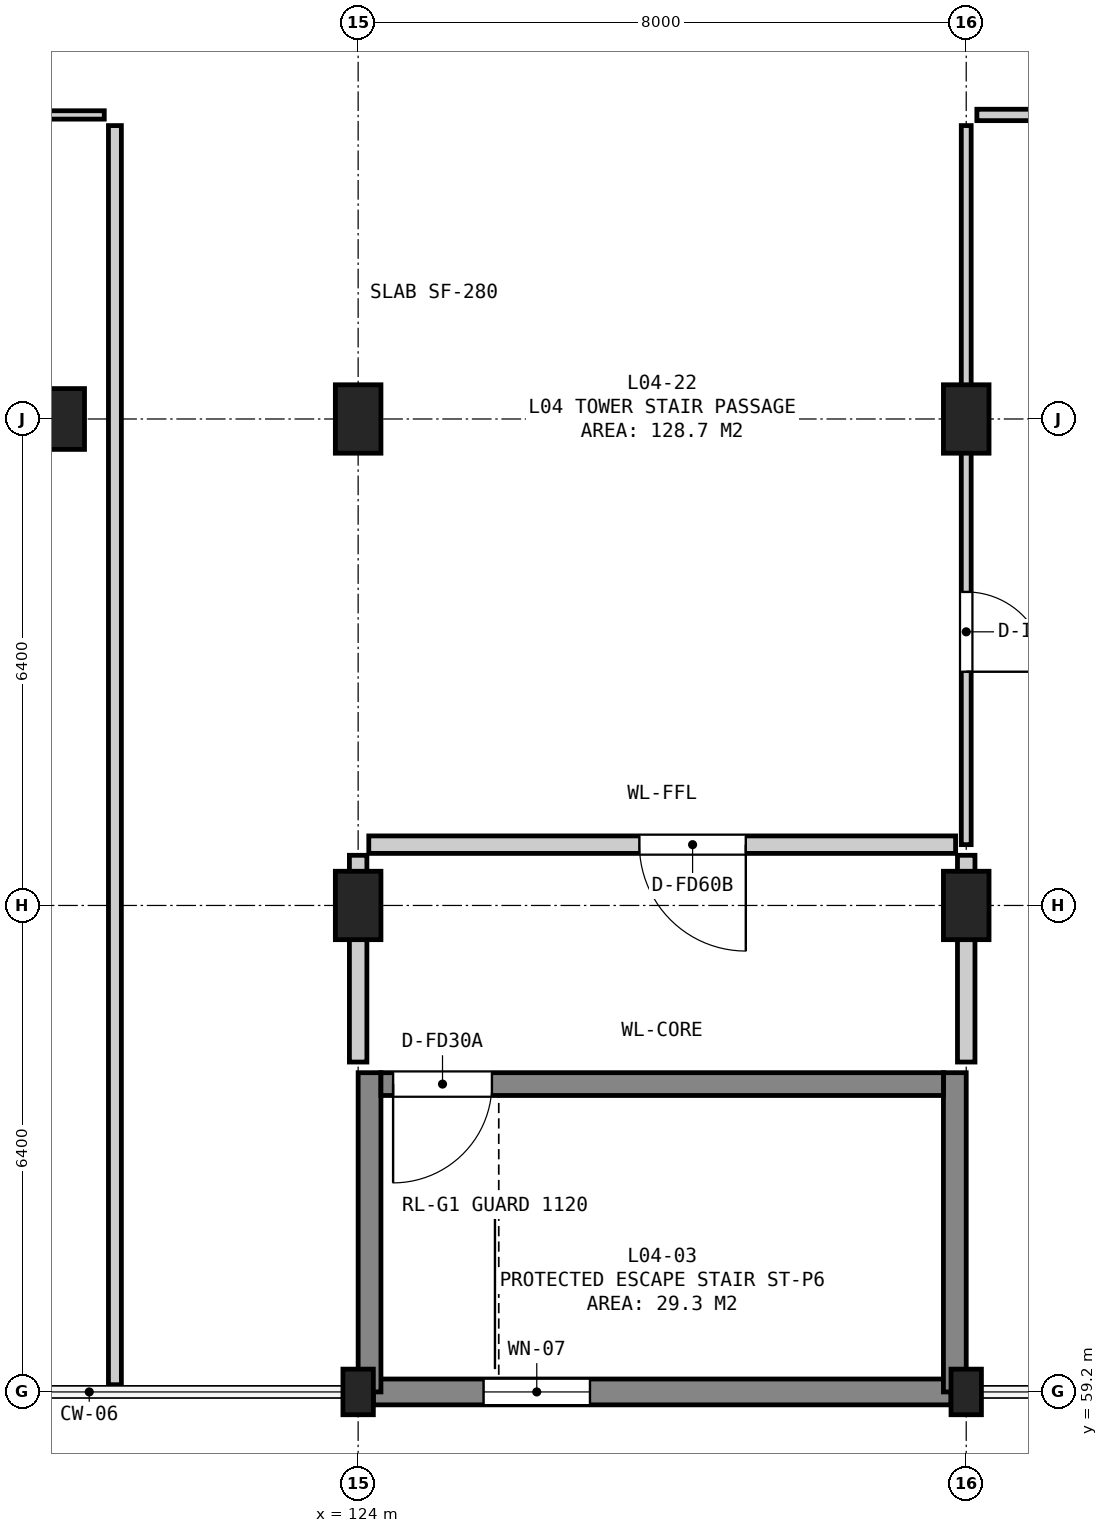
"""IFC4 building model, lengths in metres.
Left out: names, types, materials, properties, quantities, classifications, styles, units other than length and angle.
Written with IfcOpenShell. Run it as: python <this file> out.ifc"""

import sys

from ifc_helpers import new_model, si_unit, direction, frame, frame_2d, origin, origin_2d, place, context, subcontext, project, spatial, rectangle, circle, extrude, element, fill, save


model = new_model("IFC4")
c1 = context("Model", 3, precision=1e-05, world=origin(), true_north=direction((0.0, 1.0)))
c2 = subcontext(c1, "Body", "Model", "MODEL_VIEW")
j1 = project(units=[si_unit("LENGTHUNIT", "METRE"), si_unit("PLANEANGLEUNIT", "RADIAN")], contexts=[c1])
p1 = place(None, origin())
s1 = spatial("IfcSite", under=j1, at=p1, CompositionType="ELEMENT")
p2 = place(p1, origin())
s2 = spatial("IfcBuilding", under=s1, at=p2, CompositionType="ELEMENT")
p3 = place(p2, frame((0.0, 0.0, 19.8)))
s3 = spatial("IfcBuildingStorey", under=s2, at=p3, CompositionType="ELEMENT", Elevation=19.8)
p4 = place(p3, frame((120.0, 72.0, 0.0), z_axis=(0.0, 0.0, 1.0), x_axis=(1.0, 0.0, 0.0)))
e1 = element("IfcColumn", 1, at=p4, inside=s3, PredefinedType="COLUMN", context=c2, shape_type="SweptSolid", body=[
    extrude(circle(Radius=0.4, at=origin_2d()), origin(), (0.0, 0.0, 1.0), 4.0),
])
p5 = place(p3, frame((124.0, 59.2, 0.0), z_axis=(0.0, 0.0, 1.0), x_axis=(1.0, 0.0, 0.0)))
e2 = element("IfcColumn", 2, at=p5, inside=s3, PredefinedType="COLUMN", context=c2, shape_type="SweptSolid", body=[
    extrude(rectangle(XDim=0.4, YDim=0.6, at=origin_2d()), origin(), (0.0, 0.0, 1.0), 4.0),
])
for number, where, z_axis, x_axis in (
    (3, (124.0, 65.6, 0.0), (0.0, 0.0, 1.0), (1.0, 0.0, 0.0)),
    (4, (124.0, 72.0, 0.0), (0.0, 0.0, 1.0), (1.0, 0.0, 0.0)),
):
    element("IfcColumn", number, at=place(p3, frame(where, z_axis=z_axis, x_axis=x_axis)), inside=s3, PredefinedType="COLUMN", context=c2, shape_type="SweptSolid", body=[
        extrude(rectangle(XDim=0.6, YDim=0.9, at=origin_2d()), origin(), (0.0, 0.0, 1.0), 4.0),
    ])
p6 = place(p3, frame((132.0, 59.2, 0.0), z_axis=(0.0, 0.0, 1.0), x_axis=(1.0, 0.0, 0.0)))
e5 = element("IfcColumn", 5, at=p6, inside=s3, PredefinedType="COLUMN", context=c2, shape_type="SweptSolid", body=[
    extrude(rectangle(XDim=0.4, YDim=0.6, at=origin_2d()), origin(), (0.0, 0.0, 1.0), 4.0),
])
for number, where, z_axis, x_axis in (
    (6, (132.0, 65.6, 0.0), (0.0, 0.0, 1.0), (1.0, 0.0, 0.0)),
    (7, (132.0, 72.0, 0.0), (0.0, 0.0, 1.0), (1.0, 0.0, 0.0)),
):
    element("IfcColumn", number, at=place(p3, frame(where, z_axis=z_axis, x_axis=x_axis)), inside=s3, PredefinedType="COLUMN", context=c2, shape_type="SweptSolid", body=[
        extrude(rectangle(XDim=0.6, YDim=0.9, at=origin_2d()), origin(), (0.0, 0.0, 1.0), 4.0),
    ])
p7 = place(p3, frame((124.2, 59.2, 0.0), z_axis=(0.0, 0.0, 1.0), x_axis=(1.0, 0.0, 0.0)))
e8 = element("IfcWall", 8, at=p7, inside=s3, PredefinedType="SOLIDWALL", context=c2, shape_type="SweptSolid", body=[
    extrude(rectangle(XDim=7.6, YDim=0.34, at=frame_2d((3.8, 0.0))), origin(), (0.0, 0.0, 1.0), 3.175),
])
p8 = place(p7, frame((1.45, 0.0, 0.9)))
e9 = element("IfcOpeningElement", 9, at=p8, cuts=e8, PredefinedType="OPENING", context=c2, shape_type="SweptSolid", body=[
    extrude(rectangle(XDim=1.4, YDim=1.8, at=frame_2d((0.7, 0.9))), frame((0.0, 0.182, 0.0), z_axis=(0.0, -1.0, 0.0), x_axis=(1.0, 0.0, 0.0)), (0.0, 0.0, 1.0), 0.364),
])
for number, where, z_axis, x_axis in (
    (10, (124.15, 59.2, 0.0), (0.0, 0.0, 1.0), (0.0, 1.0, 0.0)),
    (11, (131.85, 59.2, 0.0), (0.0, 0.0, 1.0), (0.0, 1.0, 0.0)),
):
    element("IfcWall", number, at=place(p3, frame(where, z_axis=z_axis, x_axis=x_axis)), inside=s3, PredefinedType="SHEAR", context=c2, shape_type="SweptSolid", body=[
        extrude(rectangle(XDim=4.2, YDim=0.3, at=frame_2d((2.1, 0.0))), origin(), (0.0, 0.0, 1.0), 3.72),
    ])
p9 = place(p3, frame((124.3, 63.25, 0.0), z_axis=(0.0, 0.0, 1.0), x_axis=(1.0, 0.0, 0.0)))
e12 = element("IfcWall", 12, at=p9, inside=s3, PredefinedType="SHEAR", context=c2, shape_type="SweptSolid", body=[
    extrude(rectangle(XDim=7.4, YDim=0.3, at=frame_2d((3.7, 0.0))), origin(), (0.0, 0.0, 1.0), 3.72),
])
p10 = place(p9, frame((0.16, 0.0, 0.0)))
e13 = element("IfcOpeningElement", 13, at=p10, cuts=e12, PredefinedType="OPENING", context=c2, shape_type="SweptSolid", body=[
    extrude(rectangle(XDim=1.3, YDim=2.18, at=frame_2d((0.65, 1.09))), frame((0.0, 0.162, 0.0), z_axis=(0.0, -1.0, 0.0), x_axis=(1.0, 0.0, 0.0)), (0.0, 0.0, 1.0), 0.324),
])
p11 = place(p3, frame((124.14, 66.4, 0.0), z_axis=(0.0, 0.0, 1.0), x_axis=(1.0, 0.0, 0.0)))
e14 = element("IfcWall", 14, at=p11, inside=s3, PredefinedType="SOLIDWALL", context=c2, shape_type="SweptSolid", body=[
    extrude(rectangle(XDim=7.72, YDim=0.23, at=frame_2d((3.86, 0.0))), origin(), (0.0, 0.0, 1.0), 3.72),
])
p12 = place(p11, frame((3.56, 0.0, 0.0)))
e15 = element("IfcOpeningElement", 15, at=p12, cuts=e14, PredefinedType="OPENING", context=c2, shape_type="SweptSolid", body=[
    extrude(rectangle(XDim=1.4, YDim=2.2, at=frame_2d((0.7, 1.1))), frame((0.0, 0.127, 0.0), z_axis=(0.0, -1.0, 0.0), x_axis=(1.0, 0.0, 0.0)), (0.0, 0.0, 1.0), 0.254),
])
p13 = place(p3, frame((124.0, 63.54, 0.0), z_axis=(0.0, 0.0, 1.0), x_axis=(0.0, 1.0, 0.0)))
e16 = element("IfcWall", 16, at=p13, inside=s3, PredefinedType="SOLIDWALL", context=c2, shape_type="SweptSolid", body=[
    extrude(rectangle(XDim=2.72, YDim=0.23, at=frame_2d((1.36, 0.0))), origin(), (0.0, 0.0, 1.0), 3.045),
])
p14 = place(p3, frame((132.0, 63.54, 0.0), z_axis=(0.0, 0.0, 1.0), x_axis=(0.0, 1.0, 0.0)))
e17 = element("IfcWall", 17, at=p14, inside=s3, PredefinedType="SOLIDWALL", context=c2, shape_type="SweptSolid", body=[
    extrude(rectangle(XDim=2.72, YDim=0.23, at=frame_2d((1.36, 0.0))), origin(), (0.0, 0.0, 1.0), 2.845),
])
p15 = place(p3, frame((96.54, 76.0, 0.0), z_axis=(0.0, 0.0, 1.0), x_axis=(1.0, 0.0, 0.0)))
e18 = element("IfcWall", 18, at=p15, inside=s3, PredefinedType="PARTITIONING", context=c2, shape_type="SweptSolid", body=[
    extrude(rectangle(XDim=24.12, YDim=0.11, at=frame_2d((12.06, 0.0))), origin(), (0.0, 0.0, 1.0), 3.72),
])
p16 = place(p15, frame((9.335, 0.0, 0.0)))
e19 = element("IfcOpeningElement", 19, at=p16, cuts=e18, PredefinedType="OPENING", context=c2, shape_type="SweptSolid", body=[
    extrude(rectangle(XDim=1.05, YDim=2.15, at=frame_2d((0.525, 1.075))), frame((0.0, 0.067, 0.0), z_axis=(0.0, -1.0, 0.0), x_axis=(1.0, 0.0, 0.0)), (0.0, 0.0, 1.0), 0.134),
])
p17 = place(p3, frame((120.8, 59.295, 0.0), z_axis=(0.0, 0.0, 1.0), x_axis=(0.0, 1.0, 0.0)))
e20 = element("IfcWall", 20, at=p17, inside=s3, PredefinedType="PARTITIONING", context=c2, shape_type="SweptSolid", body=[
    extrude(rectangle(XDim=16.565, YDim=0.17, at=frame_2d((8.283, 0.0))), origin(), (0.0, 0.0, 1.0), 3.72),
])
p18 = place(p3, frame((132.14, 76.0, 0.0), z_axis=(0.0, 0.0, 1.0), x_axis=(1.0, 0.0, 0.0)))
e21 = element("IfcWall", 21, at=p18, inside=s3, PredefinedType="PARTITIONING", context=c2, shape_type="SweptSolid", body=[
    extrude(rectangle(XDim=29.32, YDim=0.15, at=frame_2d((14.66, 0.0))), origin(), (0.0, 0.0, 1.0), 3.72),
])
p19 = place(p3, frame((132.0, 66.4, 0.0), z_axis=(0.0, 0.0, 1.0), x_axis=(0.0, 1.0, 0.0)))
e22 = element("IfcWall", 22, at=p19, inside=s3, PredefinedType="PARTITIONING", context=c2, shape_type="SweptSolid", body=[
    extrude(rectangle(XDim=9.46, YDim=0.13, at=frame_2d((4.73, 0.0))), origin(), (0.0, 0.0, 1.0), 2.895),
])
p20 = place(p19, frame((2.275, 0.0, 0.0)))
e23 = element("IfcOpeningElement", 23, at=p20, cuts=e22, PredefinedType="OPENING", context=c2, shape_type="SweptSolid", body=[
    extrude(rectangle(XDim=1.05, YDim=2.15, at=frame_2d((0.525, 1.075))), frame((0.0, 0.077, 0.0), z_axis=(0.0, -1.0, 0.0), x_axis=(1.0, 0.0, 0.0)), (0.0, 0.0, 1.0), 0.154),
])
p21 = place(p8, origin())
e24 = element("IfcWindow", 24, at=p21, inside=s3, PartitioningType="SINGLE_PANEL", PredefinedType="WINDOW", context=c2, shape_type="SweptSolid", body=[
    extrude(rectangle(XDim=1.4, YDim=1.8, at=frame_2d((0.7, 0.9))), frame((0.0, 0.03, 0.0), z_axis=(0.0, -1.0, 0.0), x_axis=(1.0, 0.0, 0.0)), (0.0, 0.0, 1.0), 0.06),
])
fill(e9, e24)
p22 = place(p10, frame((1.3, 0.0, 0.0), z_axis=(0.0, 0.0, 1.0), x_axis=(-1.0, 0.0, 0.0)))
e25 = element("IfcDoor", 25, at=p22, inside=s3, OperationType="SINGLE_SWING_RIGHT", PredefinedType="DOOR", context=c2, shape_type="SweptSolid", body=[
    extrude(rectangle(XDim=1.3, YDim=2.18, at=frame_2d((0.65, 1.09))), frame((0.0, 0.025, 0.0), z_axis=(0.0, -1.0, 0.0), x_axis=(1.0, 0.0, 0.0)), (0.0, 0.0, 1.0), 0.05),
])
fill(e13, e25)
p23 = place(p12, frame((1.4, 0.0, 0.0), z_axis=(0.0, 0.0, 1.0), x_axis=(-1.0, 0.0, 0.0)))
e26 = element("IfcDoor", 26, at=p23, inside=s3, OperationType="SINGLE_SWING_LEFT", PredefinedType="DOOR", context=c2, shape_type="SweptSolid", body=[
    extrude(rectangle(XDim=1.4, YDim=2.2, at=frame_2d((0.7, 1.1))), frame((0.0, 0.025, 0.0), z_axis=(0.0, -1.0, 0.0), x_axis=(1.0, 0.0, 0.0)), (0.0, 0.0, 1.0), 0.05),
])
fill(e15, e26)
p24 = place(p20, frame((1.05, 0.0, 0.0), z_axis=(0.0, 0.0, 1.0), x_axis=(-1.0, 0.0, 0.0)))
e27 = element("IfcDoor", 27, at=p24, inside=s3, OperationType="SINGLE_SWING_RIGHT", PredefinedType="DOOR", context=c2, shape_type="SweptSolid", body=[
    extrude(rectangle(XDim=1.05, YDim=2.15, at=frame_2d((0.525, 1.075))), frame((0.0, 0.025, 0.0), z_axis=(0.0, -1.0, 0.0), x_axis=(1.0, 0.0, 0.0)), (0.0, 0.0, 1.0), 0.05),
])
fill(e23, e27)
save(model, sys.argv[1])
